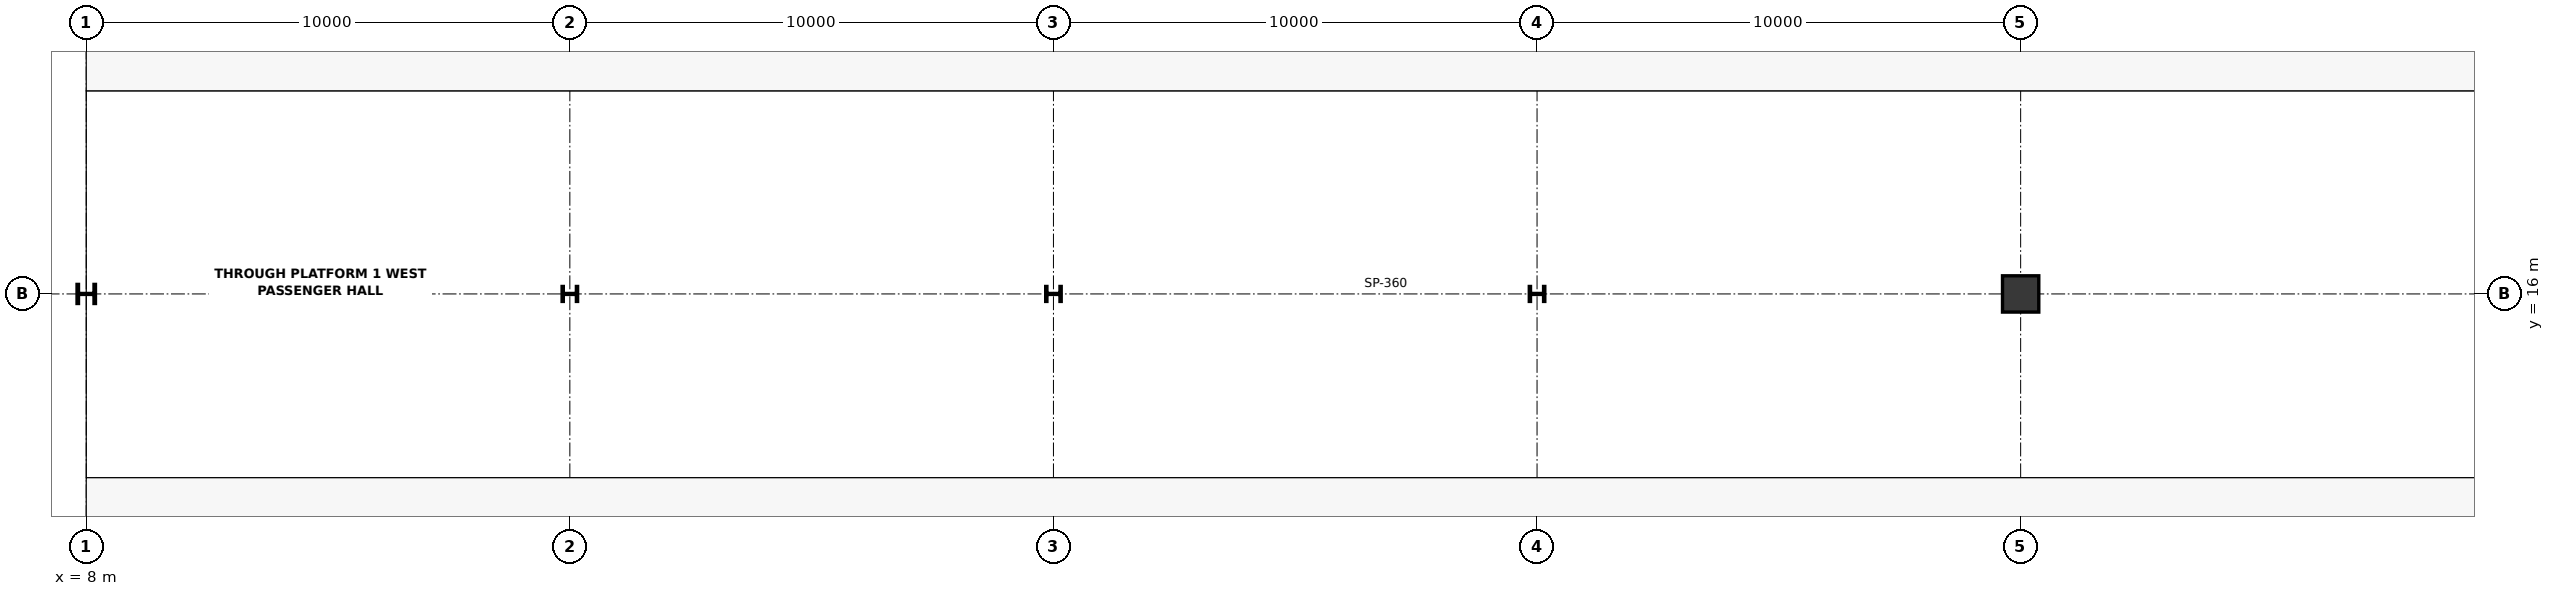
"""IFC4 building model, lengths in metres.
Left out: names, types, materials, properties, quantities, classifications, styles, units other than length and angle.
Written with IfcOpenShell. Run it as: python <this file> out.ifc"""

import sys

from ifc_helpers import new_model, si_unit, direction, frame, origin, origin_2d, place, context, subcontext, project, spatial, rectangle, i_section, extrude, element, save


model = new_model("IFC4")
c1 = context("Model", 3, precision=1e-05, world=origin(), true_north=direction((0.0, 1.0)))
c2 = subcontext(c1, "Body", "Model", "MODEL_VIEW")
j1 = project(units=[si_unit("LENGTHUNIT", "METRE"), si_unit("PLANEANGLEUNIT", "RADIAN")], contexts=[c1])
p1 = place(None, origin())
s1 = spatial("IfcSite", under=j1, at=p1, CompositionType="ELEMENT")
p2 = place(p1, origin())
s2 = spatial("IfcBuilding", under=s1, at=p2, CompositionType="ELEMENT")
p3 = place(p2, origin())
s3 = spatial("IfcBuildingStorey", under=s2, at=p3, CompositionType="ELEMENT", Elevation=0.0)
p4 = place(p3, frame((8.0, 16.0, 0.0), z_axis=(0.0, 0.0, 1.0), x_axis=(1.0, 0.0, 0.0)))
e1 = element("IfcColumn", 1, at=p4, inside=s3, PredefinedType="COLUMN", context=c2, shape_type="SweptSolid", body=[
    extrude(i_section(OverallWidth=0.395, OverallDepth=0.381, WebThickness=0.018, FlangeThickness=0.03, FilletRadius=0.015, at=origin_2d()), origin(), (0.0, 0.0, 1.0), 5.4),
])
for number, where, z_axis, x_axis in (
    (2, (18.0, 16.0, 0.0), (0.0, 0.0, 1.0), (1.0, 0.0, 0.0)),
    (3, (28.0, 16.0, 0.0), (0.0, 0.0, 1.0), (1.0, 0.0, 0.0)),
    (4, (38.0, 16.0, 0.0), (0.0, 0.0, 1.0), (1.0, 0.0, 0.0)),
):
    element("IfcColumn", number, at=place(p3, frame(where, z_axis=z_axis, x_axis=x_axis)), inside=s3, PredefinedType="COLUMN", context=c2, shape_type="SweptSolid", body=[
        extrude(i_section(OverallWidth=0.309, OverallDepth=0.321, WebThickness=0.014, FlangeThickness=0.022, FilletRadius=0.015, at=origin_2d()), origin(), (0.0, 0.0, 1.0), 5.4),
    ])
p5 = place(p3, frame((48.0, 16.0, 0.0), z_axis=(0.0, 0.0, 1.0), x_axis=(1.0, 0.0, 0.0)))
e5 = element("IfcColumn", 5, at=p5, inside=s3, PredefinedType="COLUMN", context=c2, shape_type="SweptSolid", body=[
    extrude(rectangle(XDim=0.75, YDim=0.75, at=origin_2d()), origin(), (0.0, 0.0, 1.0), 5.4),
])
save(model, sys.argv[1])
